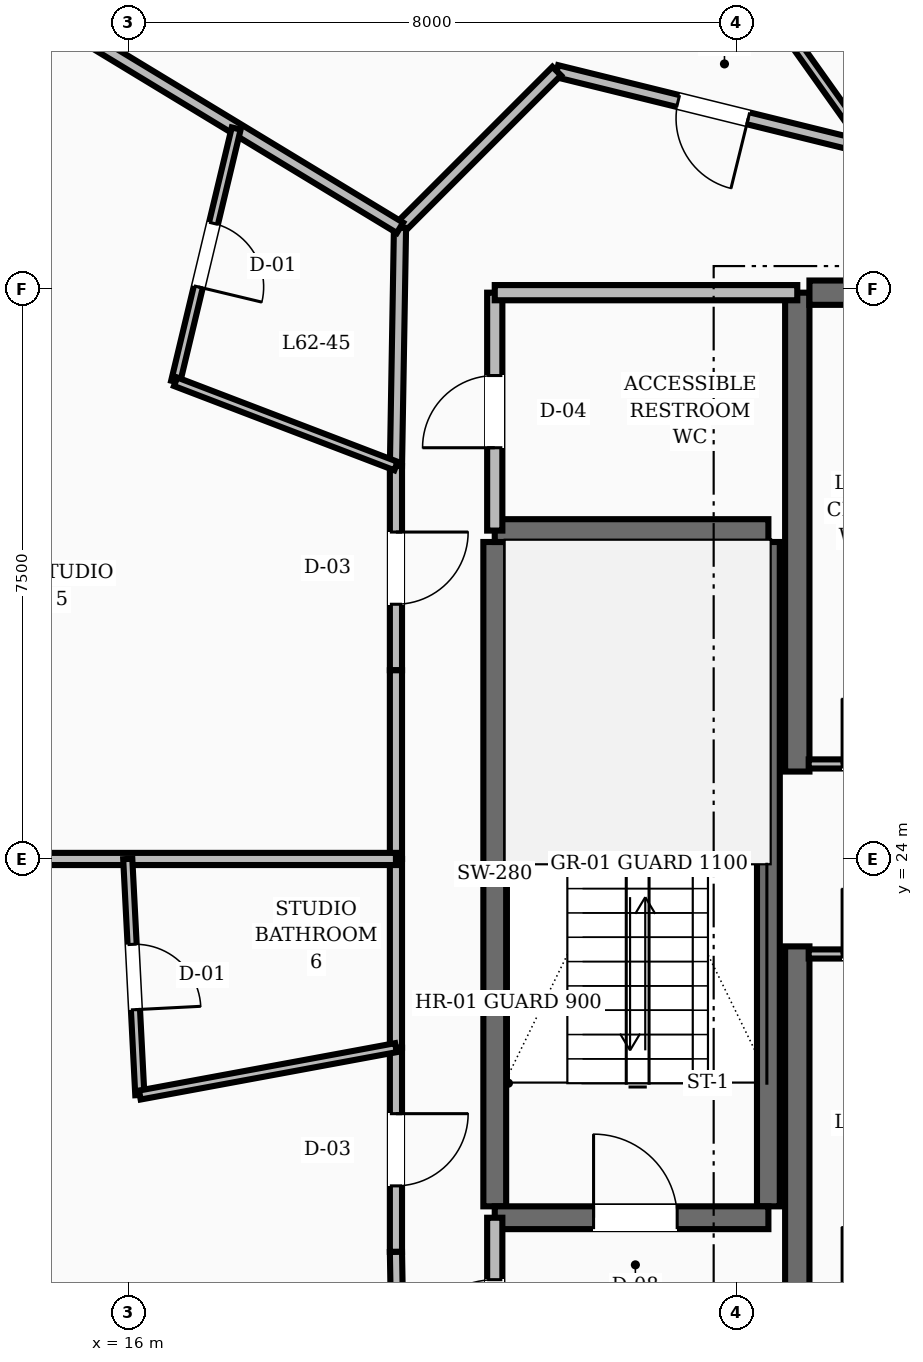
"""IFC4 building model, lengths in metres.
Left out: names, types, materials, properties, quantities, classifications, styles, units other than length and angle.
Written with IfcOpenShell. Run it as: python <this file> out.ifc"""

import sys

from ifc_helpers import new_model, si_unit, direction, frame, frame_2d, origin, place, context, subcontext, project, spatial, rectangle, extrude, element, fill, save


model = new_model("IFC4")
c1 = context("Model", 3, precision=1e-05, world=origin(), true_north=direction((0.0, 1.0)))
c2 = subcontext(c1, "Body", "Model", "MODEL_VIEW")
j1 = project(units=[si_unit("LENGTHUNIT", "METRE"), si_unit("PLANEANGLEUNIT", "RADIAN")], contexts=[c1])
p1 = place(None, origin())
s1 = spatial("IfcSite", under=j1, at=p1, CompositionType="ELEMENT")
p2 = place(p1, origin())
s2 = spatial("IfcBuilding", under=s1, at=p2, CompositionType="ELEMENT")
p3 = place(p2, frame((0.0, 0.0, 240.0)))
s3 = spatial("IfcBuildingStorey", under=s2, at=p3, CompositionType="ELEMENT", Elevation=240.0)
for number, where, z_axis, x_axis in (
    (1, (24.8, 16.55, 0.0), (0.0, 0.0, 1.0), (0.0, 1.0, 0.0)),
    (2, (24.8, 25.15, 0.0), (0.0, 0.0, 1.0), (0.0, 1.0, 0.0)),
):
    element("IfcWall", number, at=place(p3, frame(where, z_axis=z_axis, x_axis=x_axis)), inside=s3, PredefinedType="SHEAR", context=c2, shape_type="SweptSolid", body=[
        extrude(rectangle(XDim=6.3, YDim=0.32, at=frame_2d((3.15, 0.0))), origin(), (0.0, 0.0, 1.0), 3.6),
    ])
p4 = place(p3, frame((24.96, 31.45, 0.0), z_axis=(0.0, 0.0, 1.0), x_axis=(1.0, 0.0, 0.0)))
e3 = element("IfcWall", 3, at=p4, inside=s3, PredefinedType="SHEAR", context=c2, shape_type="SweptSolid", body=[
    extrude(rectangle(XDim=3.24, YDim=0.32, at=frame_2d((1.62, 0.0))), origin(), (0.0, 0.0, 1.0), 3.6),
])
for number, where, z_axis, x_axis in (
    (4, (20.82, 19.43, 0.0), (0.0, 0.0, 1.0), (0.0, 1.0, 0.0)),
    (5, (24.42, 19.43, 0.0), (0.0, 0.0, 1.0), (0.0, 1.0, 0.0)),
):
    element("IfcWall", number, at=place(p3, frame(where, z_axis=z_axis, x_axis=x_axis)), inside=s3, PredefinedType="SHEAR", context=c2, shape_type="SweptSolid", body=[
        extrude(rectangle(XDim=8.74, YDim=0.3, at=frame_2d((4.37, 0.0))), origin(), (0.0, 0.0, 1.0), 3.6),
    ])
p5 = place(p3, frame((20.82, 19.28, 0.0), z_axis=(0.0, 0.0, 1.0), x_axis=(1.0, 0.0, 0.0)))
e6 = element("IfcWall", 6, at=p5, inside=s3, PredefinedType="SHEAR", context=c2, shape_type="SweptSolid", body=[
    extrude(rectangle(XDim=3.6, YDim=0.3, at=frame_2d((1.8, 0.0))), origin(), (0.0, 0.0, 1.0), 3.6),
])
p6 = place(p5, frame((1.3, 0.0, 0.0)))
e7 = element("IfcOpeningElement", 7, at=p6, cuts=e6, PredefinedType="OPENING", context=c2, shape_type="SweptSolid", body=[
    extrude(rectangle(XDim=1.1, YDim=2.1, at=frame_2d((0.55, 1.05))), frame((0.0, 0.16, 0.0), z_axis=(0.0, -1.0, 0.0), x_axis=(1.0, 0.0, 0.0)), (0.0, 0.0, 1.0), 0.32),
])
p7 = place(p3, frame((20.82, 28.32, 0.0), z_axis=(0.0, 0.0, 1.0), x_axis=(1.0, 0.0, 0.0)))
e8 = element("IfcWall", 8, at=p7, inside=s3, PredefinedType="SHEAR", context=c2, shape_type="SweptSolid", body=[
    extrude(rectangle(XDim=3.6, YDim=0.3, at=frame_2d((1.8, 0.0))), origin(), (0.0, 0.0, 1.0), 3.6),
])
p8 = place(p3, frame((20.82, 16.55, 0.0), z_axis=(0.0, 0.0, 1.0), x_axis=(0.0, 1.0, 0.0)))
e9 = element("IfcWall", 9, at=p8, inside=s3, PredefinedType="SOLIDWALL", context=c2, shape_type="SweptSolid", body=[
    extrude(rectangle(XDim=2.73, YDim=0.2, at=frame_2d((1.365, 0.0))), origin(), (0.0, 0.0, 1.0), 2.87),
])
p9 = place(p8, frame((0.815, 0.0, 0.0)))
e10 = element("IfcOpeningElement", 10, at=p9, cuts=e9, PredefinedType="OPENING", context=c2, shape_type="SweptSolid", body=[
    extrude(rectangle(XDim=1.1, YDim=2.1, at=frame_2d((0.55, 1.05))), frame((0.0, 0.11, 0.0), z_axis=(0.0, -1.0, 0.0), x_axis=(1.0, 0.0, 0.0)), (0.0, 0.0, 1.0), 0.22),
])
p10 = place(p3, frame((20.82, 28.32, 0.0), z_axis=(0.0, 0.0, 1.0), x_axis=(0.0, 1.0, 0.0)))
e11 = element("IfcWall", 11, at=p10, inside=s3, PredefinedType="SOLIDWALL", context=c2, shape_type="SweptSolid", body=[
    extrude(rectangle(XDim=3.13, YDim=0.2, at=frame_2d((1.565, 0.0))), origin(), (0.0, 0.0, 1.0), 2.87),
])
p11 = place(p10, frame((1.09, 0.0, 0.0)))
e12 = element("IfcOpeningElement", 12, at=p11, cuts=e11, PredefinedType="OPENING", context=c2, shape_type="SweptSolid", body=[
    extrude(rectangle(XDim=0.95, YDim=2.1, at=frame_2d((0.475, 1.05))), frame((0.0, 0.11, 0.0), z_axis=(0.0, -1.0, 0.0), x_axis=(1.0, 0.0, 0.0)), (0.0, 0.0, 1.0), 0.22),
])
p12 = place(p3, frame((20.82, 31.45, 0.0), z_axis=(0.0, 0.0, 1.0), x_axis=(1.0, 0.0, 0.0)))
e13 = element("IfcWall", 13, at=p12, inside=s3, PredefinedType="SOLIDWALL", context=c2, shape_type="SweptSolid", body=[
    extrude(rectangle(XDim=3.98, YDim=0.2, at=frame_2d((1.99, 0.0))), origin(), (0.0, 0.0, 1.0), 2.87),
])
p13 = place(p3, frame((24.95, 25.25, 0.0), z_axis=(0.0, 0.0, 1.0), x_axis=(1.0, 0.0, 0.0)))
e14 = element("IfcWall", 14, at=p13, inside=s3, PredefinedType="PARTITIONING", context=c2, shape_type="SweptSolid", body=[
    extrude(rectangle(XDim=3.2, YDim=0.12, at=frame_2d((1.6, 0.0))), origin(), (0.0, 0.0, 1.0), 2.87),
])
p14 = place(p13, frame((0.44, 0.0, 0.0)))
e15 = element("IfcOpeningElement", 15, at=p14, cuts=e14, PredefinedType="OPENING", context=c2, shape_type="SweptSolid", body=[
    extrude(rectangle(XDim=0.86, YDim=2.1, at=frame_2d((0.43, 1.05))), frame((0.0, 0.07, 0.0), z_axis=(0.0, -1.0, 0.0), x_axis=(1.0, 0.0, 0.0)), (0.0, 0.0, 1.0), 0.14),
])
p15 = place(p13, frame((1.9, 0.0, 0.0)))
e16 = element("IfcOpeningElement", 16, at=p15, cuts=e14, PredefinedType="OPENING", context=c2, shape_type="SweptSolid", body=[
    extrude(rectangle(XDim=0.86, YDim=2.1, at=frame_2d((0.43, 1.05))), frame((0.0, 0.07, 0.0), z_axis=(0.0, -1.0, 0.0), x_axis=(1.0, 0.0, 0.0)), (0.0, 0.0, 1.0), 0.14),
])
p16 = place(p3, frame((24.95, 22.75, 0.0), z_axis=(0.0, 0.0, 1.0), x_axis=(1.0, 0.0, 0.0)))
e17 = element("IfcWall", 17, at=p16, inside=s3, PredefinedType="PARTITIONING", context=c2, shape_type="SweptSolid", body=[
    extrude(rectangle(XDim=3.2, YDim=0.12, at=frame_2d((1.6, 0.0))), origin(), (0.0, 0.0, 1.0), 2.87),
])
p17 = place(p16, frame((0.44, 0.0, 0.0)))
e18 = element("IfcOpeningElement", 18, at=p17, cuts=e17, PredefinedType="OPENING", context=c2, shape_type="SweptSolid", body=[
    extrude(rectangle(XDim=0.86, YDim=2.1, at=frame_2d((0.43, 1.05))), frame((0.0, 0.07, 0.0), z_axis=(0.0, -1.0, 0.0), x_axis=(1.0, 0.0, 0.0)), (0.0, 0.0, 1.0), 0.14),
])
p18 = place(p16, frame((1.9, 0.0, 0.0)))
e19 = element("IfcOpeningElement", 19, at=p18, cuts=e17, PredefinedType="OPENING", context=c2, shape_type="SweptSolid", body=[
    extrude(rectangle(XDim=0.86, YDim=2.1, at=frame_2d((0.43, 1.05))), frame((0.0, 0.07, 0.0), z_axis=(0.0, -1.0, 0.0), x_axis=(1.0, 0.0, 0.0)), (0.0, 0.0, 1.0), 0.14),
])
p19 = place(p3, frame((25.752, 33.35, 0.0), z_axis=(0.0, 0.0, 1.0), x_axis=(-0.970939799552, 0.239323850978, 0.0)))
e20 = element("IfcWall", 20, at=p19, inside=s3, PredefinedType="SOLIDWALL", context=c2, shape_type="SweptSolid", body=[
    extrude(rectangle(XDim=4.241, YDim=0.16, at=frame_2d((2.12, 0.0))), origin(), (0.0, 0.0, 1.0), 2.87),
])
p20 = place(p19, frame((1.646, 0.0, 0.0)))
e21 = element("IfcOpeningElement", 21, at=p20, cuts=e20, PredefinedType="OPENING", context=c2, shape_type="SweptSolid", body=[
    extrude(rectangle(XDim=0.95, YDim=2.1, at=frame_2d((0.475, 1.05))), frame((0.0, 0.09, 0.0), z_axis=(0.0, -1.0, 0.0), x_axis=(1.0, 0.0, 0.0)), (0.0, 0.0, 1.0), 0.18),
])
p21 = place(p3, frame((21.635, 34.365, 0.0), z_axis=(0.0, 0.0, 1.0), x_axis=(-0.707106781187, -0.707106781187, 0.0)))
e22 = element("IfcWall", 22, at=p21, inside=s3, PredefinedType="SOLIDWALL", context=c2, shape_type="SweptSolid", body=[
    extrude(rectangle(XDim=2.916, YDim=0.16, at=frame_2d((1.458, 0.0))), origin(), (0.0, 0.0, 1.0), 2.87),
])
p22 = place(p3, frame((19.573, 32.303, 0.0), z_axis=(0.0, 0.0, 1.0), x_axis=(-0.016981035134, -0.999855811828, 0.0)))
e23 = element("IfcWall", 23, at=p22, inside=s3, PredefinedType="SOLIDWALL", context=c2, shape_type="SweptSolid", body=[
    extrude(rectangle(XDim=3.134, YDim=0.16, at=frame_2d((1.567, 0.0))), origin(), (0.0, 0.0, 1.0), 2.87),
])
p23 = place(p3, frame((19.52, 29.169, 0.0), z_axis=(0.0, 0.0, 1.0), x_axis=(0.0, -1.0, 0.0)))
e24 = element("IfcWall", 24, at=p23, inside=s3, PredefinedType="SOLIDWALL", context=c2, shape_type="SweptSolid", body=[
    extrude(rectangle(XDim=2.687, YDim=0.16, at=frame_2d((1.344, 0.0))), origin(), (0.0, 0.0, 1.0), 2.87),
])
p24 = place(p23, frame((0.868, 0.0, 0.0)))
e25 = element("IfcOpeningElement", 25, at=p24, cuts=e24, PredefinedType="OPENING", context=c2, shape_type="SweptSolid", body=[
    extrude(rectangle(XDim=0.95, YDim=2.1, at=frame_2d((0.475, 1.05))), frame((0.0, 0.09, 0.0), z_axis=(0.0, -1.0, 0.0), x_axis=(1.0, 0.0, 0.0)), (0.0, 0.0, 1.0), 0.18),
])
for number, where, z_axis, x_axis in (
    (26, (19.52, 26.482, 0.0), (0.0, 0.0, 1.0), (0.0, -1.0, 0.0)),
    (27, (19.52, 24.0, 0.0), (0.0, 0.0, 1.0), (0.0, -1.0, 0.0)),
):
    element("IfcWall", number, at=place(p3, frame(where, z_axis=z_axis, x_axis=x_axis)), inside=s3, PredefinedType="SOLIDWALL", context=c2, shape_type="SweptSolid", body=[
        extrude(rectangle(XDim=2.482, YDim=0.16, at=frame_2d((1.241, 0.0))), origin(), (0.0, 0.0, 1.0), 2.87),
    ])
p25 = place(p3, frame((19.52, 21.518, 0.0), z_axis=(0.0, 0.0, 1.0), x_axis=(0.0, -1.0, 0.0)))
e28 = element("IfcWall", 28, at=p25, inside=s3, PredefinedType="SOLIDWALL", context=c2, shape_type="SweptSolid", body=[
    extrude(rectangle(XDim=2.687, YDim=0.16, at=frame_2d((1.344, 0.0))), origin(), (0.0, 0.0, 1.0), 2.87),
])
p26 = place(p25, frame((0.868, 0.0, 0.0)))
e29 = element("IfcOpeningElement", 29, at=p26, cuts=e28, PredefinedType="OPENING", context=c2, shape_type="SweptSolid", body=[
    extrude(rectangle(XDim=0.95, YDim=2.1, at=frame_2d((0.475, 1.05))), frame((0.0, 0.09, 0.0), z_axis=(0.0, -1.0, 0.0), x_axis=(1.0, 0.0, 0.0)), (0.0, 0.0, 1.0), 0.18),
])
p27 = place(p3, frame((19.52, 18.831, 0.0), z_axis=(0.0, 0.0, 1.0), x_axis=(0.016981035134, -0.999855811828, 0.0)))
e30 = element("IfcWall", 30, at=p27, inside=s3, PredefinedType="SOLIDWALL", context=c2, shape_type="SweptSolid", body=[
    extrude(rectangle(XDim=3.134, YDim=0.16, at=frame_2d((1.567, 0.0))), origin(), (0.0, 0.0, 1.0), 2.87),
])
p28 = place(p3, frame((28.127, 33.35, 0.0), z_axis=(0.0, 0.0, 1.0), x_axis=(-0.401173204802, 0.916002216017, 0.0)))
e31 = element("IfcWall", 31, at=p28, inside=s3, PredefinedType="SOLIDWALL", context=c2, shape_type="SweptSolid", body=[
    extrude(rectangle(XDim=11.058, YDim=0.16, at=frame_2d((5.529, 0.0))), origin(), (0.0, 0.0, 1.0), 2.87),
])
p29 = place(p3, frame((25.752, 33.35, 0.0), z_axis=(0.0, 0.0, 1.0), x_axis=(-0.579393118197, 0.81504822838, 0.0)))
e32 = element("IfcWall", 32, at=p29, inside=s3, PredefinedType="PARTITIONING", context=c2, shape_type="SweptSolid", body=[
    extrude(rectangle(XDim=3.833, YDim=0.12, at=frame_2d((1.917, 0.0))), origin(), (0.0, 0.0, 1.0), 2.87),
])
p30 = place(p3, frame((19.573, 32.303, 0.0), z_axis=(0.0, 0.0, 1.0), x_axis=(-0.855087696753, 0.518483394973, 0.0)))
e33 = element("IfcWall", 33, at=p30, inside=s3, PredefinedType="SOLIDWALL", context=c2, shape_type="SweptSolid", body=[
    extrude(rectangle(XDim=6.581, YDim=0.16, at=frame_2d((3.291, 0.0))), origin(), (0.0, 0.0, 1.0), 2.87),
])
p31 = place(p3, frame((17.418, 33.61, 0.0), z_axis=(0.0, 0.0, 1.0), x_axis=(-0.232763726017, -0.97253331452, 0.0)))
e34 = element("IfcWall", 34, at=p31, inside=s3, PredefinedType="PARTITIONING", context=c2, shape_type="SweptSolid", body=[
    extrude(rectangle(XDim=3.426, YDim=0.12, at=frame_2d((1.713, 0.0))), origin(), (0.0, 0.0, 1.0), 2.87),
])
p32 = place(p31, frame((1.283, 0.0, 0.0)))
e35 = element("IfcOpeningElement", 35, at=p32, cuts=e34, PredefinedType="OPENING", context=c2, shape_type="SweptSolid", body=[
    extrude(rectangle(XDim=0.86, YDim=2.1, at=frame_2d((0.43, 1.05))), frame((0.0, 0.07, 0.0), z_axis=(0.0, -1.0, 0.0), x_axis=(1.0, 0.0, 0.0)), (0.0, 0.0, 1.0), 0.14),
])
p33 = place(p3, frame((19.52, 29.169, 0.0), z_axis=(0.0, 0.0, 1.0), x_axis=(-0.934000889724, 0.357270678889, 0.0)))
e36 = element("IfcWall", 36, at=p33, inside=s3, PredefinedType="PARTITIONING", context=c2, shape_type="SweptSolid", body=[
    extrude(rectangle(XDim=3.104, YDim=0.12, at=frame_2d((1.552, 0.0))), origin(), (0.0, 0.0, 1.0), 2.87),
])
p34 = place(p3, frame((19.52, 24.0, 0.0), z_axis=(0.0, 0.0, 1.0), x_axis=(-1.0, 0.0, 0.0)))
e37 = element("IfcWall", 37, at=p34, inside=s3, PredefinedType="SOLIDWALL", context=c2, shape_type="SweptSolid", body=[
    extrude(rectangle(XDim=9.235, YDim=0.16, at=frame_2d((4.618, 0.0))), origin(), (0.0, 0.0, 1.0), 2.87),
])
p35 = place(p3, frame((15.991, 24.0, 0.0), z_axis=(0.0, 0.0, 1.0), x_axis=(0.051108341929, -0.998693114718, 0.0)))
e38 = element("IfcWall", 38, at=p35, inside=s3, PredefinedType="PARTITIONING", context=c2, shape_type="SweptSolid", body=[
    extrude(rectangle(XDim=3.11, YDim=0.12, at=frame_2d((1.555, 0.0))), origin(), (0.0, 0.0, 1.0), 2.87),
])
p36 = place(p35, frame((1.125, 0.0, 0.0)))
e39 = element("IfcOpeningElement", 39, at=p36, cuts=e38, PredefinedType="OPENING", context=c2, shape_type="SweptSolid", body=[
    extrude(rectangle(XDim=0.86, YDim=2.1, at=frame_2d((0.43, 1.05))), frame((0.0, 0.07, 0.0), z_axis=(0.0, -1.0, 0.0), x_axis=(1.0, 0.0, 0.0)), (0.0, 0.0, 1.0), 0.14),
])
p37 = place(p3, frame((19.52, 21.518, 0.0), z_axis=(0.0, 0.0, 1.0), x_axis=(-0.983319307479, -0.181887711346, 0.0)))
e40 = element("IfcWall", 40, at=p37, inside=s3, PredefinedType="PARTITIONING", context=c2, shape_type="SweptSolid", body=[
    extrude(rectangle(XDim=3.427, YDim=0.12, at=frame_2d((1.713, 0.0))), origin(), (0.0, 0.0, 1.0), 2.87),
])
p38 = place(p6, origin())
e41 = element("IfcDoor", 41, at=p38, inside=s3, OperationType="SINGLE_SWING_LEFT", PredefinedType="DOOR", context=c2, shape_type="SweptSolid", body=[
    extrude(rectangle(XDim=1.1, YDim=2.1, at=frame_2d((0.55, 1.05))), frame((0.0, 0.025, 0.0), z_axis=(0.0, -1.0, 0.0), x_axis=(1.0, 0.0, 0.0)), (0.0, 0.0, 1.0), 0.05),
])
fill(e7, e41)
p39 = place(p9, origin())
e42 = element("IfcDoor", 42, at=p39, inside=s3, OperationType="SINGLE_SWING_LEFT", PredefinedType="DOOR", context=c2, shape_type="SweptSolid", body=[
    extrude(rectangle(XDim=1.1, YDim=2.1, at=frame_2d((0.55, 1.05))), frame((0.0, 0.025, 0.0), z_axis=(0.0, -1.0, 0.0), x_axis=(1.0, 0.0, 0.0)), (0.0, 0.0, 1.0), 0.05),
])
fill(e10, e42)
p40 = place(p11, origin())
e43 = element("IfcDoor", 43, at=p40, inside=s3, OperationType="SINGLE_SWING_LEFT", PredefinedType="DOOR", context=c2, shape_type="SweptSolid", body=[
    extrude(rectangle(XDim=0.95, YDim=2.1, at=frame_2d((0.475, 1.05))), frame((0.0, 0.025, 0.0), z_axis=(0.0, -1.0, 0.0), x_axis=(1.0, 0.0, 0.0)), (0.0, 0.0, 1.0), 0.05),
])
fill(e12, e43)
p41 = place(p14, origin())
e44 = element("IfcDoor", 44, at=p41, inside=s3, OperationType="SINGLE_SWING_LEFT", PredefinedType="DOOR", context=c2, shape_type="SweptSolid", body=[
    extrude(rectangle(XDim=0.86, YDim=2.1, at=frame_2d((0.43, 1.05))), frame((0.0, 0.025, 0.0), z_axis=(0.0, -1.0, 0.0), x_axis=(1.0, 0.0, 0.0)), (0.0, 0.0, 1.0), 0.05),
])
fill(e15, e44)
p42 = place(p17, origin())
e45 = element("IfcDoor", 45, at=p42, inside=s3, OperationType="SINGLE_SWING_LEFT", PredefinedType="DOOR", context=c2, shape_type="SweptSolid", body=[
    extrude(rectangle(XDim=0.86, YDim=2.1, at=frame_2d((0.43, 1.05))), frame((0.0, 0.025, 0.0), z_axis=(0.0, -1.0, 0.0), x_axis=(1.0, 0.0, 0.0)), (0.0, 0.0, 1.0), 0.05),
])
fill(e18, e45)
p43 = place(p20, origin())
e46 = element("IfcDoor", 46, at=p43, inside=s3, OperationType="SINGLE_SWING_LEFT", PredefinedType="DOOR", context=c2, shape_type="SweptSolid", body=[
    extrude(rectangle(XDim=0.95, YDim=2.1, at=frame_2d((0.475, 1.05))), frame((0.0, 0.025, 0.0), z_axis=(0.0, -1.0, 0.0), x_axis=(1.0, 0.0, 0.0)), (0.0, 0.0, 1.0), 0.05),
])
fill(e21, e46)
p44 = place(p32, origin())
e47 = element("IfcDoor", 47, at=p44, inside=s3, OperationType="SINGLE_SWING_RIGHT", PredefinedType="DOOR", context=c2, shape_type="SweptSolid", body=[
    extrude(rectangle(XDim=0.86, YDim=2.1, at=frame_2d((0.43, 1.05))), frame((0.0, 0.025, 0.0), z_axis=(0.0, -1.0, 0.0), x_axis=(1.0, 0.0, 0.0)), (0.0, 0.0, 1.0), 0.05),
])
fill(e35, e47)
p45 = place(p24, origin())
e48 = element("IfcDoor", 48, at=p45, inside=s3, OperationType="SINGLE_SWING_LEFT", PredefinedType="DOOR", context=c2, shape_type="SweptSolid", body=[
    extrude(rectangle(XDim=0.95, YDim=2.1, at=frame_2d((0.475, 1.05))), frame((0.0, 0.025, 0.0), z_axis=(0.0, -1.0, 0.0), x_axis=(1.0, 0.0, 0.0)), (0.0, 0.0, 1.0), 0.05),
])
fill(e25, e48)
p46 = place(p36, origin())
e49 = element("IfcDoor", 49, at=p46, inside=s3, OperationType="SINGLE_SWING_RIGHT", PredefinedType="DOOR", context=c2, shape_type="SweptSolid", body=[
    extrude(rectangle(XDim=0.86, YDim=2.1, at=frame_2d((0.43, 1.05))), frame((0.0, 0.025, 0.0), z_axis=(0.0, -1.0, 0.0), x_axis=(1.0, 0.0, 0.0)), (0.0, 0.0, 1.0), 0.05),
])
fill(e39, e49)
p47 = place(p26, origin())
e50 = element("IfcDoor", 50, at=p47, inside=s3, OperationType="SINGLE_SWING_LEFT", PredefinedType="DOOR", context=c2, shape_type="SweptSolid", body=[
    extrude(rectangle(XDim=0.95, YDim=2.1, at=frame_2d((0.475, 1.05))), frame((0.0, 0.025, 0.0), z_axis=(0.0, -1.0, 0.0), x_axis=(1.0, 0.0, 0.0)), (0.0, 0.0, 1.0), 0.05),
])
fill(e29, e50)
save(model, sys.argv[1])
